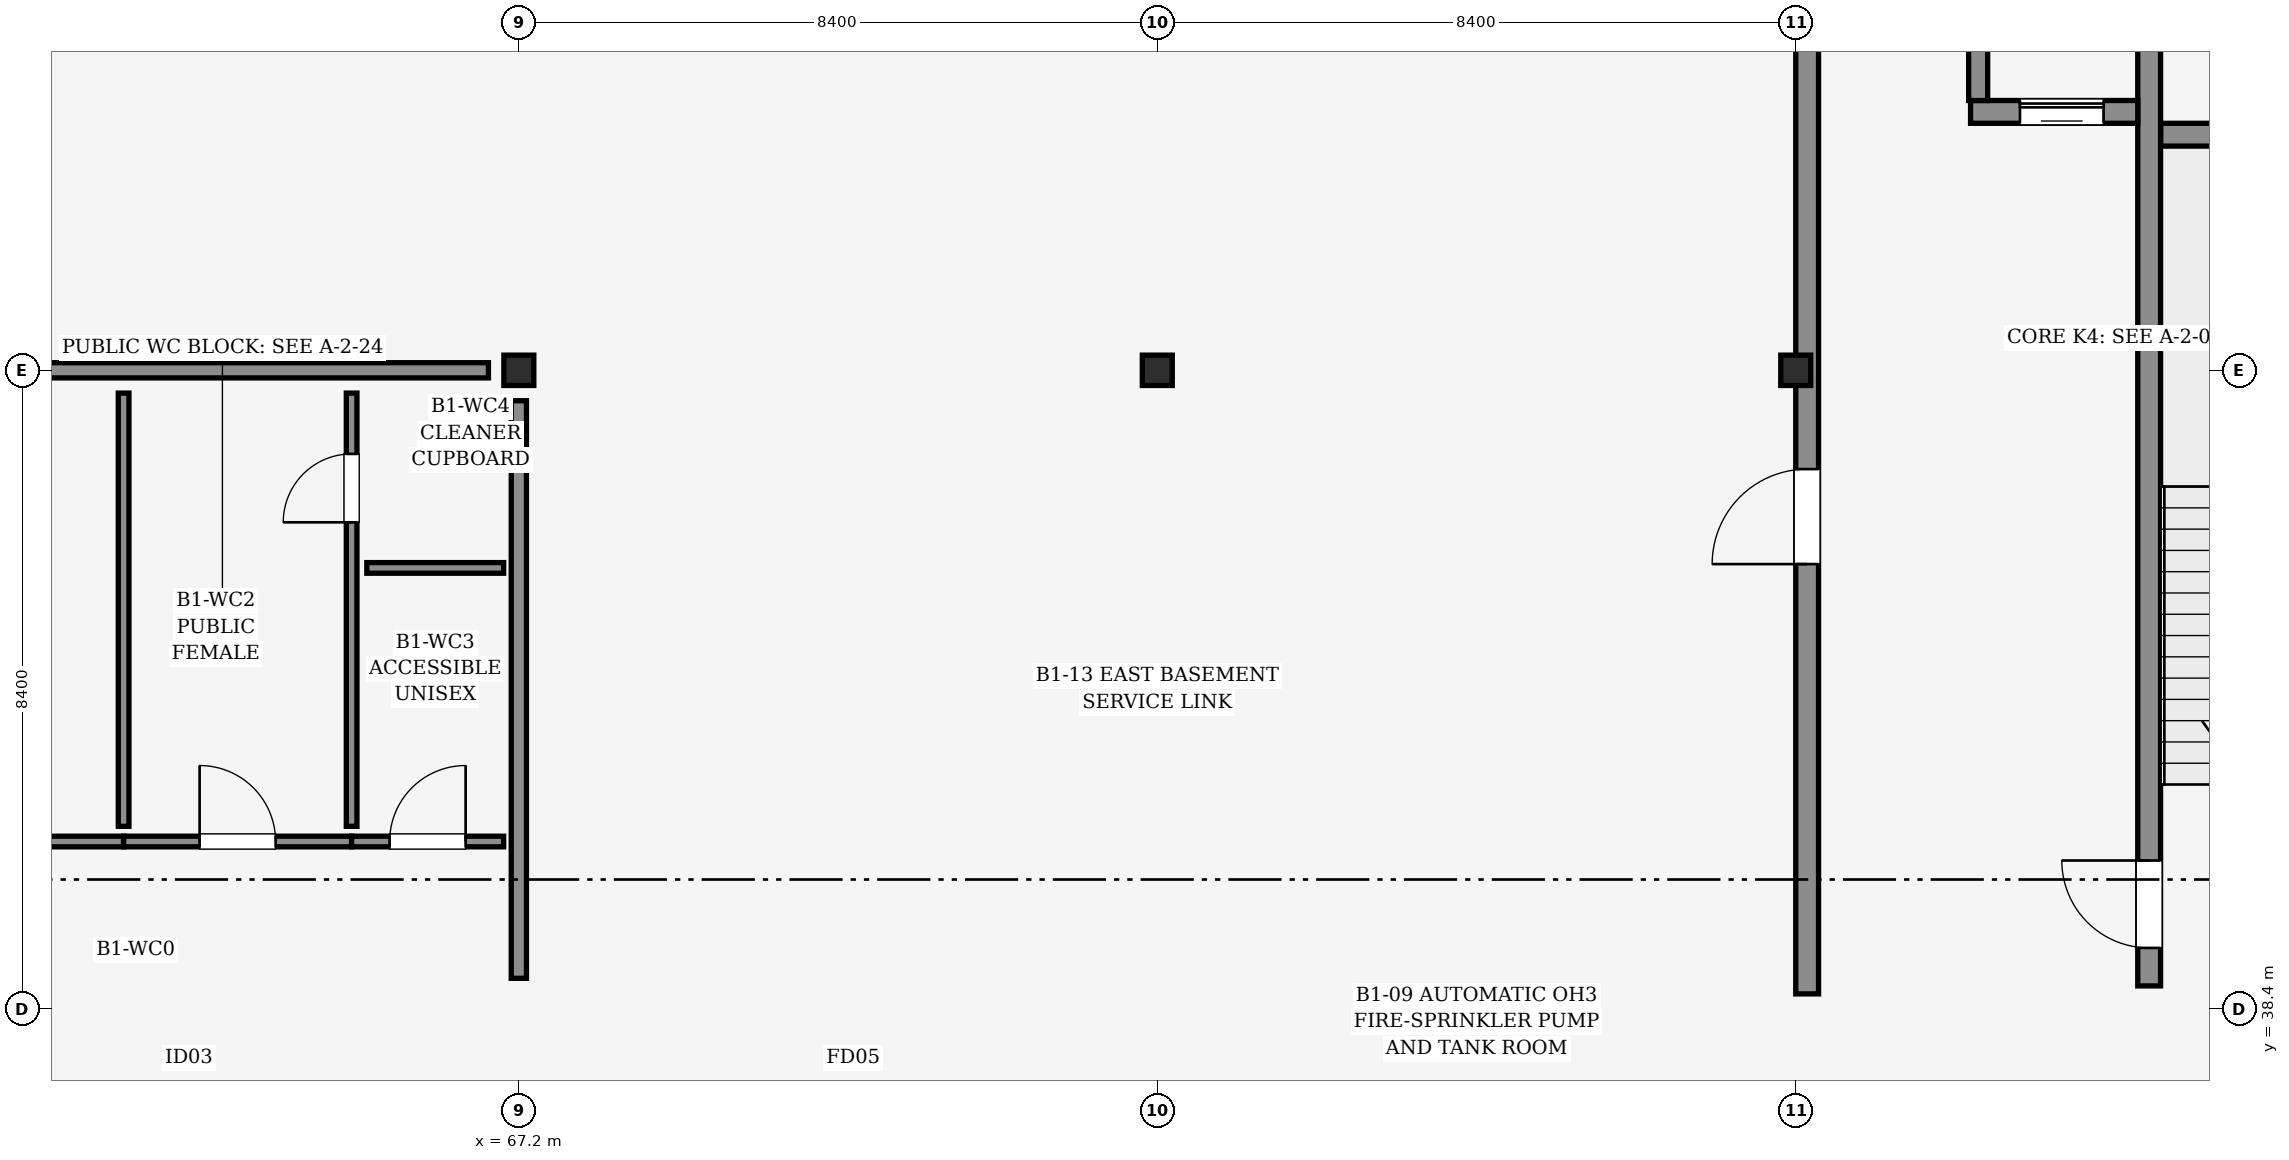
"""IFC4 building model, lengths in metres.
Left out: names, types, materials, properties, quantities, classifications, styles, units other than length and angle.
Written with IfcOpenShell. Run it as: python <this file> out.ifc"""

import sys

from ifc_helpers import new_model, si_unit, direction, frame, frame_2d, origin, origin_2d, place, context, subcontext, project, spatial, rectangle, i_section, extrude, element, fill, save


model = new_model("IFC4")
c1 = context("Model", 3, precision=1e-05, world=origin(), true_north=direction((0.0, 1.0)))
c2 = subcontext(c1, "Body", "Model", "MODEL_VIEW")
j1 = project(units=[si_unit("LENGTHUNIT", "METRE"), si_unit("PLANEANGLEUNIT", "RADIAN")], contexts=[c1])
p1 = place(None, origin())
s1 = spatial("IfcSite", under=j1, at=p1, CompositionType="ELEMENT")
p2 = place(p1, origin())
s2 = spatial("IfcBuilding", under=s1, at=p2, CompositionType="ELEMENT")
p3 = place(p2, frame((0.0, 0.0, -5.4)))
s3 = spatial("IfcBuildingStorey", under=s2, at=p3, CompositionType="ELEMENT", Elevation=-5.4)
for number, where, z_axis, x_axis in (
    (1, (67.2, 38.4, 0.0), (0.0, 0.0, 1.0), (1.0, 0.0, 0.0)),
    (2, (67.2, 46.8, 0.0), (0.0, 0.0, 1.0), (1.0, 0.0, 0.0)),
    (3, (75.6, 38.4, 0.0), (0.0, 0.0, 1.0), (1.0, 0.0, 0.0)),
    (4, (75.6, 46.8, 0.0), (0.0, 0.0, 1.0), (1.0, 0.0, 0.0)),
    (5, (84.0, 38.4, 0.0), (0.0, 0.0, 1.0), (1.0, 0.0, 0.0)),
    (6, (84.0, 46.8, 0.0), (0.0, 0.0, 1.0), (1.0, 0.0, 0.0)),
):
    element("IfcColumn", number, at=place(p3, frame(where, z_axis=z_axis, x_axis=x_axis)), inside=s3, PredefinedType="COLUMN", context=c2, shape_type="SweptSolid", body=[
        extrude(i_section(OverallWidth=0.399, OverallDepth=0.394, WebThickness=0.023, FlangeThickness=0.037, FilletRadius=0.015, at=origin_2d()), origin(), (0.0, 0.0, 1.0), 5.4),
    ])
p4 = place(p3, frame((84.198, 38.55, 0.0), z_axis=(0.0, 0.0, 1.0), x_axis=(1.0, 0.0, 0.0)))
e7 = element("IfcWall", 7, at=p4, inside=s3, PredefinedType="SHEAR", context=c2, shape_type="SweptSolid", body=[
    extrude(rectangle(XDim=8.005, YDim=0.3, at=frame_2d((4.002, 0.0))), origin(), (0.0, 0.0, 1.0), 5.12),
])
p5 = place(p3, frame((88.8, 49.9, 0.0), z_axis=(0.0, 0.0, 1.0), x_axis=(1.0, 0.0, 0.0)))
e8 = element("IfcWall", 8, at=p5, inside=s3, PredefinedType="SHEAR", context=c2, shape_type="SweptSolid", body=[
    extrude(rectangle(XDim=3.3, YDim=0.3, at=frame_2d((1.65, 0.0))), origin(), (0.0, 0.0, 1.0), 5.12),
])
p6 = place(p3, frame((84.15, 38.595, 0.0), z_axis=(0.0, 0.0, 1.0), x_axis=(0.0, 1.0, 0.0)))
e9 = element("IfcWall", 9, at=p6, inside=s3, PredefinedType="SHEAR", context=c2, shape_type="SweptSolid", body=[
    extrude(rectangle(XDim=16.41, YDim=0.3, at=frame_2d((8.205, 0.0))), origin(), (0.0, 0.0, 1.0), 5.12),
])
p7 = place(p6, frame((5.655, 0.0, 0.0)))
e10 = element("IfcOpeningElement", 10, at=p7, cuts=e9, PredefinedType="OPENING", context=c2, shape_type="SweptSolid", body=[
    extrude(rectangle(XDim=1.25, YDim=2.15, at=frame_2d((0.625, 1.075))), frame((0.0, 0.16, 0.0), z_axis=(0.0, -1.0, 0.0), x_axis=(1.0, 0.0, 0.0)), (0.0, 0.0, 1.0), 0.32),
])
p8 = place(p3, frame((88.65, 38.7, 0.0), z_axis=(0.0, 0.0, 1.0), x_axis=(0.0, 1.0, 0.0)))
e11 = element("IfcWall", 11, at=p8, inside=s3, PredefinedType="SHEAR", context=c2, shape_type="SweptSolid", body=[
    extrude(rectangle(XDim=16.2, YDim=0.3, at=frame_2d((8.1, 0.0))), origin(), (0.0, 0.0, 1.0), 5.12),
])
p9 = place(p8, frame((0.5, 0.0, 0.0)))
e12 = element("IfcOpeningElement", 12, at=p9, cuts=e11, PredefinedType="OPENING", context=c2, shape_type="SweptSolid", body=[
    extrude(rectangle(XDim=1.15, YDim=2.15, at=frame_2d((0.575, 1.075))), frame((0.0, 0.16, 0.0), z_axis=(0.0, -1.0, 0.0), x_axis=(1.0, 0.0, 0.0)), (0.0, 0.0, 1.0), 0.32),
])
p10 = place(p3, frame((86.3, 50.2, 0.0), z_axis=(0.0, 0.0, 1.0), x_axis=(1.0, 0.0, 0.0)))
e13 = element("IfcWall", 13, at=p10, inside=s3, PredefinedType="SHEAR", context=c2, shape_type="SweptSolid", body=[
    extrude(rectangle(XDim=2.2, YDim=0.3, at=frame_2d((1.1, 0.0))), origin(), (0.0, 0.0, 1.0), 5.12),
])
p11 = place(p10, frame((0.65, 0.0, 0.0)))
e14 = element("IfcOpeningElement", 14, at=p11, cuts=e13, PredefinedType="OPENING", context=c2, shape_type="SweptSolid", body=[
    extrude(rectangle(XDim=1.1, YDim=2.2, at=frame_2d((0.55, 1.1))), frame((0.0, 0.16, 0.0), z_axis=(0.0, -1.0, 0.0), x_axis=(1.0, 0.0, 0.0)), (0.0, 0.0, 1.0), 0.32),
])
p12 = place(p3, frame((86.4, 50.35, 0.0), z_axis=(0.0, 0.0, 1.0), x_axis=(0.0, 1.0, 0.0)))
e15 = element("IfcWall", 15, at=p12, inside=s3, PredefinedType="PARTITIONING", context=c2, shape_type="SweptSolid", body=[
    extrude(rectangle(XDim=4.55, YDim=0.25, at=frame_2d((2.275, 0.0))), origin(), (0.0, 0.0, 1.0), 4.025),
])
p13 = place(p3, frame((59.2, 38.4, 0.0), z_axis=(0.0, 0.0, 1.0), x_axis=(1.0, 0.0, 0.0)))
e16 = element("IfcWall", 16, at=p13, inside=s3, PredefinedType="PARTITIONING", context=c2, shape_type="SweptSolid", body=[
    extrude(rectangle(XDim=7.6, YDim=0.2, at=frame_2d((3.8, 0.0))), origin(), (0.0, 0.0, 1.0), 4.025),
])
p14 = place(p13, frame((3.2, 0.0, 0.0)))
e17 = element("IfcOpeningElement", 17, at=p14, cuts=e16, PredefinedType="OPENING", context=c2, shape_type="SweptSolid", body=[
    extrude(rectangle(XDim=0.92, YDim=2.1, at=frame_2d((0.46, 1.05))), frame((0.0, 0.11, 0.0), z_axis=(0.0, -1.0, 0.0), x_axis=(1.0, 0.0, 0.0)), (0.0, 0.0, 1.0), 0.22),
])
p15 = place(p3, frame((59.2, 46.8, 0.0), z_axis=(0.0, 0.0, 1.0), x_axis=(1.0, 0.0, 0.0)))
e18 = element("IfcWall", 18, at=p15, inside=s3, PredefinedType="PARTITIONING", context=c2, shape_type="SweptSolid", body=[
    extrude(rectangle(XDim=7.6, YDim=0.2, at=frame_2d((3.8, 0.0))), origin(), (0.0, 0.0, 1.0), 4.025),
])
p16 = place(p3, frame((67.2, 38.8, 0.0), z_axis=(0.0, 0.0, 1.0), x_axis=(0.0, 1.0, 0.0)))
e19 = element("IfcWall", 19, at=p16, inside=s3, PredefinedType="PARTITIONING", context=c2, shape_type="SweptSolid", body=[
    extrude(rectangle(XDim=7.6, YDim=0.2, at=frame_2d((3.8, 0.0))), origin(), (0.0, 0.0, 1.0), 4.025),
])
p17 = place(p3, frame((59.0, 40.6, 0.0), z_axis=(0.0, 0.0, 1.0), x_axis=(1.0, 0.0, 0.0)))
e20 = element("IfcWall", 20, at=p17, inside=s3, PredefinedType="PARTITIONING", context=c2, shape_type="SweptSolid", body=[
    extrude(rectangle(XDim=3.0, YDim=0.14, at=frame_2d((1.5, 0.0))), origin(), (0.0, 0.0, 1.0), 4.025),
])
p18 = place(p17, frame((1.0, 0.0, 0.0)))
e21 = element("IfcOpeningElement", 21, at=p18, cuts=e20, PredefinedType="OPENING", context=c2, shape_type="SweptSolid", body=[
    extrude(rectangle(XDim=1.0, YDim=2.1, at=frame_2d((0.5, 1.05))), frame((0.0, 0.08, 0.0), z_axis=(0.0, -1.0, 0.0), x_axis=(1.0, 0.0, 0.0)), (0.0, 0.0, 1.0), 0.16),
])
p19 = place(p3, frame((62.0, 40.6, 0.0), z_axis=(0.0, 0.0, 1.0), x_axis=(1.0, 0.0, 0.0)))
e22 = element("IfcWall", 22, at=p19, inside=s3, PredefinedType="PARTITIONING", context=c2, shape_type="SweptSolid", body=[
    extrude(rectangle(XDim=3.0, YDim=0.14, at=frame_2d((1.5, 0.0))), origin(), (0.0, 0.0, 1.0), 4.025),
])
p20 = place(p19, frame((1.0, 0.0, 0.0)))
e23 = element("IfcOpeningElement", 23, at=p20, cuts=e22, PredefinedType="OPENING", context=c2, shape_type="SweptSolid", body=[
    extrude(rectangle(XDim=1.0, YDim=2.1, at=frame_2d((0.5, 1.05))), frame((0.0, 0.08, 0.0), z_axis=(0.0, -1.0, 0.0), x_axis=(1.0, 0.0, 0.0)), (0.0, 0.0, 1.0), 0.16),
])
p21 = place(p3, frame((65.0, 40.6, 0.0), z_axis=(0.0, 0.0, 1.0), x_axis=(1.0, 0.0, 0.0)))
e24 = element("IfcWall", 24, at=p21, inside=s3, PredefinedType="PARTITIONING", context=c2, shape_type="SweptSolid", body=[
    extrude(rectangle(XDim=2.0, YDim=0.14, at=frame_2d((1.0, 0.0))), origin(), (0.0, 0.0, 1.0), 4.025),
])
p22 = place(p21, frame((0.5, 0.0, 0.0)))
e25 = element("IfcOpeningElement", 25, at=p22, cuts=e24, PredefinedType="OPENING", context=c2, shape_type="SweptSolid", body=[
    extrude(rectangle(XDim=1.0, YDim=2.1, at=frame_2d((0.5, 1.05))), frame((0.0, 0.08, 0.0), z_axis=(0.0, -1.0, 0.0), x_axis=(1.0, 0.0, 0.0)), (0.0, 0.0, 1.0), 0.16),
])
p23 = place(p3, frame((62.0, 40.8, 0.0), z_axis=(0.0, 0.0, 1.0), x_axis=(0.0, 1.0, 0.0)))
e26 = element("IfcWall", 26, at=p23, inside=s3, PredefinedType="PARTITIONING", context=c2, shape_type="SweptSolid", body=[
    extrude(rectangle(XDim=5.7, YDim=0.14, at=frame_2d((2.85, 0.0))), origin(), (0.0, 0.0, 1.0), 4.025),
])
p24 = place(p3, frame((65.0, 40.8, 0.0), z_axis=(0.0, 0.0, 1.0), x_axis=(0.0, 1.0, 0.0)))
e27 = element("IfcWall", 27, at=p24, inside=s3, PredefinedType="PARTITIONING", context=c2, shape_type="SweptSolid", body=[
    extrude(rectangle(XDim=5.7, YDim=0.14, at=frame_2d((2.85, 0.0))), origin(), (0.0, 0.0, 1.0), 4.025),
])
p25 = place(p24, frame((4.0, 0.0, 0.0)))
e28 = element("IfcOpeningElement", 28, at=p25, cuts=e27, PredefinedType="OPENING", context=c2, shape_type="SweptSolid", body=[
    extrude(rectangle(XDim=0.9, YDim=2.05, at=frame_2d((0.45, 1.025))), frame((0.0, 0.08, 0.0), z_axis=(0.0, -1.0, 0.0), x_axis=(1.0, 0.0, 0.0)), (0.0, 0.0, 1.0), 0.16),
])
p26 = place(p3, frame((65.2, 44.2, 0.0), z_axis=(0.0, 0.0, 1.0), x_axis=(1.0, 0.0, 0.0)))
e29 = element("IfcWall", 29, at=p26, inside=s3, PredefinedType="PARTITIONING", context=c2, shape_type="SweptSolid", body=[
    extrude(rectangle(XDim=1.8, YDim=0.14, at=frame_2d((0.9, 0.0))), origin(), (0.0, 0.0, 1.0), 4.025),
])
p27 = place(p3, frame((67.6, 38.4, 0.0), z_axis=(0.0, 0.0, 1.0), x_axis=(1.0, 0.0, 0.0)))
e30 = element("IfcWall", 30, at=p27, inside=s3, PredefinedType="PARTITIONING", context=c2, shape_type="SweptSolid", body=[
    extrude(rectangle(XDim=16.2, YDim=0.25, at=frame_2d((8.1, 0.0))), origin(), (0.0, 0.0, 1.0), 4.025),
])
p28 = place(p27, frame((3.5, 0.0, 0.0)))
e31 = element("IfcOpeningElement", 31, at=p28, cuts=e30, PredefinedType="OPENING", context=c2, shape_type="SweptSolid", body=[
    extrude(rectangle(XDim=1.0, YDim=2.15, at=frame_2d((0.5, 1.075))), frame((0.0, 0.135, 0.0), z_axis=(0.0, -1.0, 0.0), x_axis=(1.0, 0.0, 0.0)), (0.0, 0.0, 1.0), 0.27),
])
p29 = place(p7, origin())
e32 = element("IfcDoor", 32, at=p29, inside=s3, OperationType="SINGLE_SWING_LEFT", PredefinedType="DOOR", context=c2, shape_type="SweptSolid", body=[
    extrude(rectangle(XDim=1.25, YDim=2.15, at=frame_2d((0.625, 1.075))), frame((0.0, 0.025, 0.0), z_axis=(0.0, -1.0, 0.0), x_axis=(1.0, 0.0, 0.0)), (0.0, 0.0, 1.0), 0.05),
])
fill(e10, e32)
p30 = place(p9, origin())
e33 = element("IfcDoor", 33, at=p30, inside=s3, OperationType="SINGLE_SWING_RIGHT", PredefinedType="DOOR", context=c2, shape_type="SweptSolid", body=[
    extrude(rectangle(XDim=1.15, YDim=2.15, at=frame_2d((0.575, 1.075))), frame((0.0, 0.025, 0.0), z_axis=(0.0, -1.0, 0.0), x_axis=(1.0, 0.0, 0.0)), (0.0, 0.0, 1.0), 0.05),
])
fill(e12, e33)
p31 = place(p11, origin())
e34 = element("IfcDoor", 34, at=p31, inside=s3, OperationType="SLIDING_TO_LEFT", PredefinedType="DOOR", context=c2, shape_type="SweptSolid", body=[
    extrude(rectangle(XDim=1.1, YDim=2.2, at=frame_2d((0.55, 1.1))), frame((0.0, 0.025, 0.0), z_axis=(0.0, -1.0, 0.0), x_axis=(1.0, 0.0, 0.0)), (0.0, 0.0, 1.0), 0.05),
])
fill(e14, e34)
p32 = place(p14, origin())
e35 = element("IfcDoor", 35, at=p32, inside=s3, OperationType="SINGLE_SWING_LEFT", PredefinedType="DOOR", context=c2, shape_type="SweptSolid", body=[
    extrude(rectangle(XDim=0.92, YDim=2.1, at=frame_2d((0.46, 1.05))), frame((0.0, 0.025, 0.0), z_axis=(0.0, -1.0, 0.0), x_axis=(1.0, 0.0, 0.0)), (0.0, 0.0, 1.0), 0.05),
])
fill(e17, e35)
p33 = place(p20, origin())
e36 = element("IfcDoor", 36, at=p33, inside=s3, OperationType="SINGLE_SWING_LEFT", PredefinedType="DOOR", context=c2, shape_type="SweptSolid", body=[
    extrude(rectangle(XDim=1.0, YDim=2.1, at=frame_2d((0.5, 1.05))), frame((0.0, 0.025, 0.0), z_axis=(0.0, -1.0, 0.0), x_axis=(1.0, 0.0, 0.0)), (0.0, 0.0, 1.0), 0.05),
])
fill(e23, e36)
p34 = place(p22, origin())
e37 = element("IfcDoor", 37, at=p34, inside=s3, OperationType="SINGLE_SWING_RIGHT", PredefinedType="DOOR", context=c2, shape_type="SweptSolid", body=[
    extrude(rectangle(XDim=1.0, YDim=2.1, at=frame_2d((0.5, 1.05))), frame((0.0, 0.025, 0.0), z_axis=(0.0, -1.0, 0.0), x_axis=(1.0, 0.0, 0.0)), (0.0, 0.0, 1.0), 0.05),
])
fill(e25, e37)
p35 = place(p25, origin())
e38 = element("IfcDoor", 38, at=p35, inside=s3, OperationType="SINGLE_SWING_LEFT", PredefinedType="DOOR", context=c2, shape_type="SweptSolid", body=[
    extrude(rectangle(XDim=0.9, YDim=2.05, at=frame_2d((0.45, 1.025))), frame((0.0, 0.025, 0.0), z_axis=(0.0, -1.0, 0.0), x_axis=(1.0, 0.0, 0.0)), (0.0, 0.0, 1.0), 0.05),
])
fill(e28, e38)
p36 = place(p28, origin())
e39 = element("IfcDoor", 39, at=p36, inside=s3, OperationType="SINGLE_SWING_LEFT", PredefinedType="DOOR", context=c2, shape_type="SweptSolid", body=[
    extrude(rectangle(XDim=1.0, YDim=2.15, at=frame_2d((0.5, 1.075))), frame((0.0, 0.025, 0.0), z_axis=(0.0, -1.0, 0.0), x_axis=(1.0, 0.0, 0.0)), (0.0, 0.0, 1.0), 0.05),
])
fill(e31, e39)
save(model, sys.argv[1])
